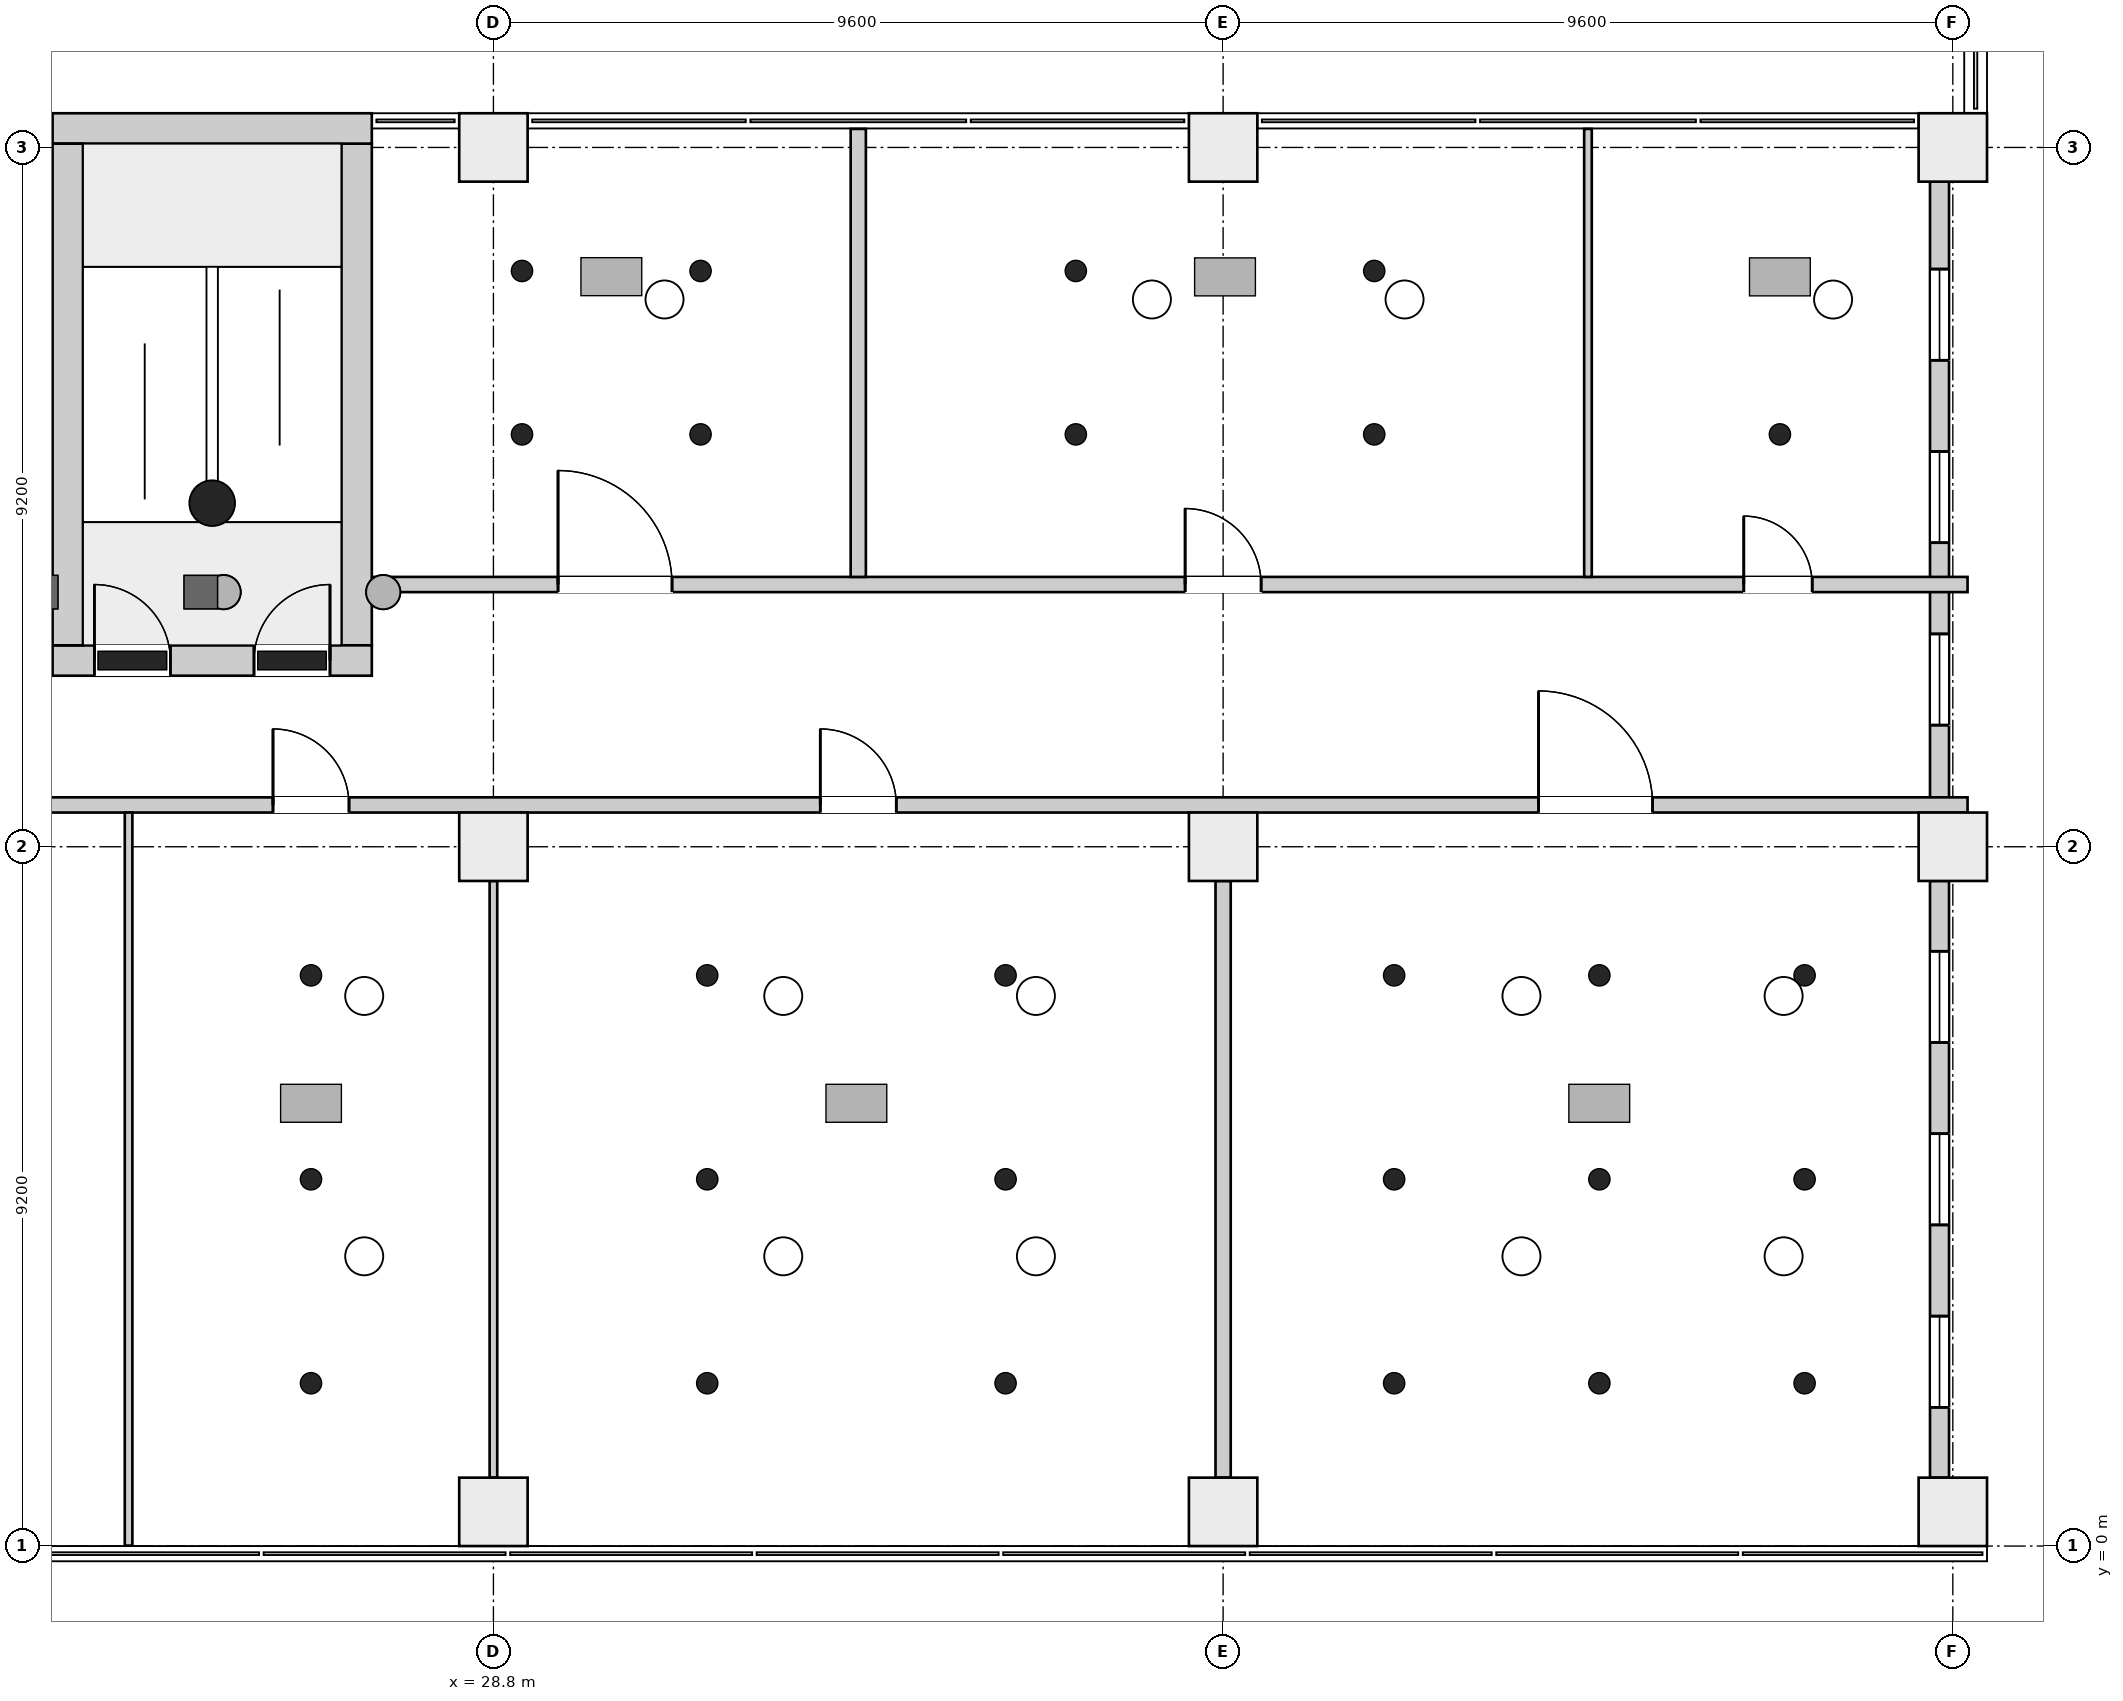
"""IFC4 building model, lengths in metres.
Left out: names, types, materials, properties, quantities, classifications, styles, units other than length and angle.
Written with IfcOpenShell. Run it as: python <this file> out.ifc"""

import sys

from ifc_helpers import new_model, si_unit, direction, frame, frame_2d, origin, origin_2d, place, context, subcontext, project, spatial, rectangle, extrude, element, fill, save


model = new_model("IFC4")
c1 = context("Model", 3, precision=1e-05, world=origin(), true_north=direction((0.0, 1.0)))
c2 = subcontext(c1, "Body", "Model", "MODEL_VIEW")
j1 = project(units=[si_unit("LENGTHUNIT", "METRE"), si_unit("PLANEANGLEUNIT", "RADIAN")], contexts=[c1])
p1 = place(None, origin())
s1 = spatial("IfcSite", under=j1, at=p1, CompositionType="ELEMENT")
p2 = place(p1, origin())
s2 = spatial("IfcBuilding", under=s1, at=p2, CompositionType="ELEMENT")
p3 = place(p2, frame((0.0, 0.0, 44.5)))
s3 = spatial("IfcBuildingStorey", under=s2, at=p3, CompositionType="ELEMENT", Elevation=44.5)
p4 = place(p3, frame((23.0, 11.65, 0.0), z_axis=(0.0, 0.0, 1.0), x_axis=(1.0, 0.0, 0.0)))
e1 = element("IfcWall", 1, at=p4, inside=s3, PredefinedType="SHEAR", context=c2, shape_type="SweptSolid", body=[
    extrude(rectangle(XDim=4.2, YDim=0.4, at=frame_2d((2.1, 0.0))), origin(), (0.0, 0.0, 1.0), 4.2),
])
p5 = place(p4, frame((0.55, 0.0, 0.0)))
e2 = element("IfcOpeningElement", 2, at=p5, cuts=e1, PredefinedType="OPENING", context=c2, shape_type="SweptSolid", body=[
    extrude(rectangle(XDim=1.0, YDim=2.1, at=frame_2d((0.5, 1.05))), frame((0.0, 0.21, 0.0), z_axis=(0.0, -1.0, 0.0), x_axis=(1.0, 0.0, 0.0)), (0.0, 0.0, 1.0), 0.42),
])
p6 = place(p4, frame((2.65, 0.0, 0.0)))
e3 = element("IfcOpeningElement", 3, at=p6, cuts=e1, PredefinedType="OPENING", context=c2, shape_type="SweptSolid", body=[
    extrude(rectangle(XDim=1.0, YDim=2.1, at=frame_2d((0.5, 1.05))), frame((0.0, 0.21, 0.0), z_axis=(0.0, -1.0, 0.0), x_axis=(1.0, 0.0, 0.0)), (0.0, 0.0, 1.0), 0.42),
])
p7 = place(p3, frame((23.0, 18.65, 0.0), z_axis=(0.0, 0.0, 1.0), x_axis=(1.0, 0.0, 0.0)))
e4 = element("IfcWall", 4, at=p7, inside=s3, PredefinedType="SHEAR", context=c2, shape_type="SweptSolid", body=[
    extrude(rectangle(XDim=4.2, YDim=0.4, at=frame_2d((2.1, 0.0))), origin(), (0.0, 0.0, 1.0), 4.2),
])
for number, where, z_axis, x_axis in (
    (5, (23.2, 11.85, 0.0), (0.0, 0.0, 1.0), (0.0, 1.0, 0.0)),
    (6, (27.0, 11.85, 0.0), (0.0, 0.0, 1.0), (0.0, 1.0, 0.0)),
):
    element("IfcWall", number, at=place(p3, frame(where, z_axis=z_axis, x_axis=x_axis)), inside=s3, PredefinedType="SHEAR", context=c2, shape_type="SweptSolid", body=[
        extrude(rectangle(XDim=6.6, YDim=0.4, at=frame_2d((3.3, 0.0))), origin(), (0.0, 0.0, 1.0), 4.2),
    ])
for number, where, z_axis, x_axis in (
    (7, (28.8, 0.45, 0.0), (0.0, 0.0, 1.0), (1.0, 0.0, 0.0)),
    (8, (38.4, 0.45, 0.0), (0.0, 0.0, 1.0), (1.0, 0.0, 0.0)),
    (9, (48.0, 0.45, 0.0), (0.0, 0.0, 1.0), (1.0, 0.0, 0.0)),
    (10, (28.8, 9.2, 0.0), (0.0, 0.0, 1.0), (1.0, 0.0, 0.0)),
    (11, (38.4, 9.2, 0.0), (0.0, 0.0, 1.0), (1.0, 0.0, 0.0)),
    (12, (48.0, 9.2, 0.0), (0.0, 0.0, 1.0), (1.0, 0.0, 0.0)),
    (13, (28.8, 18.4, 0.0), (0.0, 0.0, 1.0), (1.0, 0.0, 0.0)),
    (14, (38.4, 18.4, 0.0), (0.0, 0.0, 1.0), (1.0, 0.0, 0.0)),
    (15, (48.0, 18.4, 0.0), (0.0, 0.0, 1.0), (1.0, 0.0, 0.0)),
):
    element("IfcColumn", number, at=place(p3, frame(where, z_axis=z_axis, x_axis=x_axis)), inside=s3, PredefinedType="COLUMN", context=c2, shape_type="SweptSolid", body=[
        extrude(rectangle(XDim=0.9, YDim=0.9, at=origin_2d()), origin(), (0.0, 0.0, 1.0), 4.2),
    ])
p8 = place(p3, frame((47.825, 0.9, 0.0), z_axis=(0.0, 0.0, 1.0), x_axis=(0.0, 1.0, 0.0)))
e16 = element("IfcWall", 16, at=p8, inside=s3, PredefinedType="ELEMENTEDWALL", context=c2, shape_type="SweptSolid", body=[
    extrude(rectangle(XDim=7.85, YDim=0.25, at=frame_2d((3.925, 0.0))), origin(), (0.0, 0.0, 1.0), 3.3),
])
p9 = place(p8, frame((0.925, 0.0, 0.6)))
e17 = element("IfcOpeningElement", 17, at=p9, cuts=e16, PredefinedType="OPENING", context=c2, shape_type="SweptSolid", body=[
    extrude(rectangle(XDim=1.2, YDim=2.6, at=frame_2d((0.6, 1.3))), frame((0.0, 0.135, 0.0), z_axis=(0.0, -1.0, 0.0), x_axis=(1.0, 0.0, 0.0)), (0.0, 0.0, 1.0), 0.27),
])
p10 = place(p8, frame((3.325, 0.0, 0.6)))
e18 = element("IfcOpeningElement", 18, at=p10, cuts=e16, PredefinedType="OPENING", context=c2, shape_type="SweptSolid", body=[
    extrude(rectangle(XDim=1.2, YDim=2.6, at=frame_2d((0.6, 1.3))), frame((0.0, 0.135, 0.0), z_axis=(0.0, -1.0, 0.0), x_axis=(1.0, 0.0, 0.0)), (0.0, 0.0, 1.0), 0.27),
])
p11 = place(p8, frame((5.725, 0.0, 0.6)))
e19 = element("IfcOpeningElement", 19, at=p11, cuts=e16, PredefinedType="OPENING", context=c2, shape_type="SweptSolid", body=[
    extrude(rectangle(XDim=1.2, YDim=2.6, at=frame_2d((0.6, 1.3))), frame((0.0, 0.135, 0.0), z_axis=(0.0, -1.0, 0.0), x_axis=(1.0, 0.0, 0.0)), (0.0, 0.0, 1.0), 0.27),
])
p12 = place(p3, frame((47.825, 9.65, 0.0), z_axis=(0.0, 0.0, 1.0), x_axis=(0.0, 1.0, 0.0)))
e20 = element("IfcWall", 20, at=p12, inside=s3, PredefinedType="ELEMENTEDWALL", context=c2, shape_type="SweptSolid", body=[
    extrude(rectangle(XDim=8.3, YDim=0.25, at=frame_2d((4.15, 0.0))), origin(), (0.0, 0.0, 1.0), 3.3),
])
p13 = place(p12, frame((1.15, 0.0, 0.6)))
e21 = element("IfcOpeningElement", 21, at=p13, cuts=e20, PredefinedType="OPENING", context=c2, shape_type="SweptSolid", body=[
    extrude(rectangle(XDim=1.2, YDim=2.6, at=frame_2d((0.6, 1.3))), frame((0.0, 0.135, 0.0), z_axis=(0.0, -1.0, 0.0), x_axis=(1.0, 0.0, 0.0)), (0.0, 0.0, 1.0), 0.27),
])
p14 = place(p12, frame((3.55, 0.0, 0.6)))
e22 = element("IfcOpeningElement", 22, at=p14, cuts=e20, PredefinedType="OPENING", context=c2, shape_type="SweptSolid", body=[
    extrude(rectangle(XDim=1.2, YDim=2.6, at=frame_2d((0.6, 1.3))), frame((0.0, 0.135, 0.0), z_axis=(0.0, -1.0, 0.0), x_axis=(1.0, 0.0, 0.0)), (0.0, 0.0, 1.0), 0.27),
])
p15 = place(p12, frame((5.95, 0.0, 0.6)))
e23 = element("IfcOpeningElement", 23, at=p15, cuts=e20, PredefinedType="OPENING", context=c2, shape_type="SweptSolid", body=[
    extrude(rectangle(XDim=1.2, YDim=2.6, at=frame_2d((0.6, 1.3))), frame((0.0, 0.135, 0.0), z_axis=(0.0, -1.0, 0.0), x_axis=(1.0, 0.0, 0.0)), (0.0, 0.0, 1.0), 0.27),
])
p16 = place(p3, frame((4.3, 9.75, 0.0), z_axis=(0.0, 0.0, 1.0), x_axis=(1.0, 0.0, 0.0)))
e24 = element("IfcWall", 24, at=p16, inside=s3, PredefinedType="PARTITIONING", context=c2, shape_type="SweptSolid", body=[
    extrude(rectangle(XDim=43.894, YDim=0.2, at=frame_2d((21.947, 0.0))), origin(), (0.0, 0.0, 1.0), 3.9),
])
p17 = place(p16, frame((2.2, 0.0, 0.0)))
e25 = element("IfcOpeningElement", 25, at=p17, cuts=e24, PredefinedType="OPENING", context=c2, shape_type="SweptSolid", body=[
    extrude(rectangle(XDim=1.0, YDim=2.1, at=frame_2d((0.5, 1.05))), frame((0.0, 0.11, 0.0), z_axis=(0.0, -1.0, 0.0), x_axis=(1.0, 0.0, 0.0)), (0.0, 0.0, 1.0), 0.22),
])
p18 = place(p16, frame((12.0, 0.0, 0.0)))
e26 = element("IfcOpeningElement", 26, at=p18, cuts=e24, PredefinedType="OPENING", context=c2, shape_type="SweptSolid", body=[
    extrude(rectangle(XDim=1.0, YDim=2.1, at=frame_2d((0.5, 1.05))), frame((0.0, 0.11, 0.0), z_axis=(0.0, -1.0, 0.0), x_axis=(1.0, 0.0, 0.0)), (0.0, 0.0, 1.0), 0.22),
])
p19 = place(p16, frame((21.6, 0.0, 0.0)))
e27 = element("IfcOpeningElement", 27, at=p19, cuts=e24, PredefinedType="OPENING", context=c2, shape_type="SweptSolid", body=[
    extrude(rectangle(XDim=1.0, YDim=2.1, at=frame_2d((0.5, 1.05))), frame((0.0, 0.11, 0.0), z_axis=(0.0, -1.0, 0.0), x_axis=(1.0, 0.0, 0.0)), (0.0, 0.0, 1.0), 0.22),
])
p20 = place(p16, frame((28.8, 0.0, 0.0)))
e28 = element("IfcOpeningElement", 28, at=p20, cuts=e24, PredefinedType="OPENING", context=c2, shape_type="SweptSolid", body=[
    extrude(rectangle(XDim=1.0, YDim=2.1, at=frame_2d((0.5, 1.05))), frame((0.0, 0.11, 0.0), z_axis=(0.0, -1.0, 0.0), x_axis=(1.0, 0.0, 0.0)), (0.0, 0.0, 1.0), 0.22),
])
p21 = place(p16, frame((38.25, 0.0, 0.0)))
e29 = element("IfcOpeningElement", 29, at=p21, cuts=e24, PredefinedType="OPENING", context=c2, shape_type="SweptSolid", body=[
    extrude(rectangle(XDim=1.5, YDim=2.1, at=frame_2d((0.75, 1.05))), frame((0.0, 0.11, 0.0), z_axis=(0.0, -1.0, 0.0), x_axis=(1.0, 0.0, 0.0)), (0.0, 0.0, 1.0), 0.22),
])
p22 = place(p3, frame((24.0, 0.006, 0.0), z_axis=(0.0, 0.0, 1.0), x_axis=(0.0, 1.0, 0.0)))
e30 = element("IfcWall", 30, at=p22, inside=s3, PredefinedType="PARTITIONING", context=c2, shape_type="SweptSolid", body=[
    extrude(rectangle(XDim=9.644, YDim=0.1, at=frame_2d((4.822, 0.0))), origin(), (0.0, 0.0, 1.0), 3.9),
])
p23 = place(p3, frame((27.206, 12.65, 0.0), z_axis=(0.0, 0.0, 1.0), x_axis=(1.0, 0.0, 0.0)))
e31 = element("IfcWall", 31, at=p23, inside=s3, PredefinedType="PARTITIONING", context=c2, shape_type="SweptSolid", body=[
    extrude(rectangle(XDim=20.988, YDim=0.2, at=frame_2d((10.494, 0.0))), origin(), (0.0, 0.0, 1.0), 3.9),
])
p24 = place(p23, frame((2.444, 0.0, 0.0)))
e32 = element("IfcOpeningElement", 32, at=p24, cuts=e31, PredefinedType="OPENING", context=c2, shape_type="SweptSolid", body=[
    extrude(rectangle(XDim=1.5, YDim=2.1, at=frame_2d((0.75, 1.05))), frame((0.0, 0.11, 0.0), z_axis=(0.0, -1.0, 0.0), x_axis=(1.0, 0.0, 0.0)), (0.0, 0.0, 1.0), 0.22),
])
p25 = place(p23, frame((10.694, 0.0, 0.0)))
e33 = element("IfcOpeningElement", 33, at=p25, cuts=e31, PredefinedType="OPENING", context=c2, shape_type="SweptSolid", body=[
    extrude(rectangle(XDim=1.0, YDim=2.1, at=frame_2d((0.5, 1.05))), frame((0.0, 0.11, 0.0), z_axis=(0.0, -1.0, 0.0), x_axis=(1.0, 0.0, 0.0)), (0.0, 0.0, 1.0), 0.22),
])
p26 = place(p23, frame((18.044, 0.0, 0.0)))
e34 = element("IfcOpeningElement", 34, at=p26, cuts=e31, PredefinedType="OPENING", context=c2, shape_type="SweptSolid", body=[
    extrude(rectangle(XDim=0.9, YDim=2.1, at=frame_2d((0.45, 1.05))), frame((0.0, 0.11, 0.0), z_axis=(0.0, -1.0, 0.0), x_axis=(1.0, 0.0, 0.0)), (0.0, 0.0, 1.0), 0.22),
])
p27 = place(p3, frame((28.8, 0.9, 0.0), z_axis=(0.0, 0.0, 1.0), x_axis=(0.0, 1.0, 0.0)))
e35 = element("IfcWall", 35, at=p27, inside=s3, PredefinedType="PARTITIONING", context=c2, shape_type="SweptSolid", body=[
    extrude(rectangle(XDim=7.85, YDim=0.1, at=frame_2d((3.925, 0.0))), origin(), (0.0, 0.0, 1.0), 3.9),
])
p28 = place(p3, frame((33.6, 12.75, 0.0), z_axis=(0.0, 0.0, 1.0), x_axis=(0.0, 1.0, 0.0)))
e36 = element("IfcWall", 36, at=p28, inside=s3, PredefinedType="PARTITIONING", context=c2, shape_type="SweptSolid", body=[
    extrude(rectangle(XDim=5.894, YDim=0.2, at=frame_2d((2.947, 0.0))), origin(), (0.0, 0.0, 1.0), 3.9),
])
p29 = place(p3, frame((38.4, 0.9, 0.0), z_axis=(0.0, 0.0, 1.0), x_axis=(0.0, 1.0, 0.0)))
e37 = element("IfcWall", 37, at=p29, inside=s3, PredefinedType="PARTITIONING", context=c2, shape_type="SweptSolid", body=[
    extrude(rectangle(XDim=7.85, YDim=0.2, at=frame_2d((3.925, 0.0))), origin(), (0.0, 0.0, 1.0), 3.9),
])
p30 = place(p3, frame((43.2, 12.75, 0.0), z_axis=(0.0, 0.0, 1.0), x_axis=(0.0, 1.0, 0.0)))
e38 = element("IfcWall", 38, at=p30, inside=s3, PredefinedType="PARTITIONING", context=c2, shape_type="SweptSolid", body=[
    extrude(rectangle(XDim=5.894, YDim=0.1, at=frame_2d((2.947, 0.0))), origin(), (0.0, 0.0, 1.0), 3.9),
])
p31 = place(p9, origin())
e39 = element("IfcWindow", 39, at=p31, inside=s3, PartitioningType="SINGLE_PANEL", PredefinedType="WINDOW", context=c2, shape_type="SweptSolid", body=[
    extrude(rectangle(XDim=1.2, YDim=2.6, at=frame_2d((0.6, 1.3))), frame((0.0, 0.03, 0.0), z_axis=(0.0, -1.0, 0.0), x_axis=(1.0, 0.0, 0.0)), (0.0, 0.0, 1.0), 0.06),
])
fill(e17, e39)
p32 = place(p10, origin())
e40 = element("IfcWindow", 40, at=p32, inside=s3, PartitioningType="SINGLE_PANEL", PredefinedType="WINDOW", context=c2, shape_type="SweptSolid", body=[
    extrude(rectangle(XDim=1.2, YDim=2.6, at=frame_2d((0.6, 1.3))), frame((0.0, 0.03, 0.0), z_axis=(0.0, -1.0, 0.0), x_axis=(1.0, 0.0, 0.0)), (0.0, 0.0, 1.0), 0.06),
])
fill(e18, e40)
p33 = place(p11, origin())
e41 = element("IfcWindow", 41, at=p33, inside=s3, PartitioningType="SINGLE_PANEL", PredefinedType="WINDOW", context=c2, shape_type="SweptSolid", body=[
    extrude(rectangle(XDim=1.2, YDim=2.6, at=frame_2d((0.6, 1.3))), frame((0.0, 0.03, 0.0), z_axis=(0.0, -1.0, 0.0), x_axis=(1.0, 0.0, 0.0)), (0.0, 0.0, 1.0), 0.06),
])
fill(e19, e41)
p34 = place(p13, origin())
e42 = element("IfcWindow", 42, at=p34, inside=s3, PartitioningType="SINGLE_PANEL", PredefinedType="WINDOW", context=c2, shape_type="SweptSolid", body=[
    extrude(rectangle(XDim=1.2, YDim=2.6, at=frame_2d((0.6, 1.3))), frame((0.0, 0.03, 0.0), z_axis=(0.0, -1.0, 0.0), x_axis=(1.0, 0.0, 0.0)), (0.0, 0.0, 1.0), 0.06),
])
fill(e21, e42)
p35 = place(p14, origin())
e43 = element("IfcWindow", 43, at=p35, inside=s3, PartitioningType="SINGLE_PANEL", PredefinedType="WINDOW", context=c2, shape_type="SweptSolid", body=[
    extrude(rectangle(XDim=1.2, YDim=2.6, at=frame_2d((0.6, 1.3))), frame((0.0, 0.03, 0.0), z_axis=(0.0, -1.0, 0.0), x_axis=(1.0, 0.0, 0.0)), (0.0, 0.0, 1.0), 0.06),
])
fill(e22, e43)
p36 = place(p15, origin())
e44 = element("IfcWindow", 44, at=p36, inside=s3, PartitioningType="SINGLE_PANEL", PredefinedType="WINDOW", context=c2, shape_type="SweptSolid", body=[
    extrude(rectangle(XDim=1.2, YDim=2.6, at=frame_2d((0.6, 1.3))), frame((0.0, 0.03, 0.0), z_axis=(0.0, -1.0, 0.0), x_axis=(1.0, 0.0, 0.0)), (0.0, 0.0, 1.0), 0.06),
])
fill(e23, e44)
p37 = place(p5, origin())
e45 = element("IfcDoor", 45, at=p37, inside=s3, OperationType="SINGLE_SWING_RIGHT", PredefinedType="DOOR", context=c2, shape_type="SweptSolid", body=[
    extrude(rectangle(XDim=1.0, YDim=2.1, at=frame_2d((0.5, 1.05))), frame((0.0, 0.025, 0.0), z_axis=(0.0, -1.0, 0.0), x_axis=(1.0, 0.0, 0.0)), (0.0, 0.0, 1.0), 0.05),
])
fill(e2, e45)
p38 = place(p6, origin())
e46 = element("IfcDoor", 46, at=p38, inside=s3, OperationType="SINGLE_SWING_LEFT", PredefinedType="DOOR", context=c2, shape_type="SweptSolid", body=[
    extrude(rectangle(XDim=1.0, YDim=2.1, at=frame_2d((0.5, 1.05))), frame((0.0, 0.025, 0.0), z_axis=(0.0, -1.0, 0.0), x_axis=(1.0, 0.0, 0.0)), (0.0, 0.0, 1.0), 0.05),
])
fill(e3, e46)
p39 = place(p19, origin())
e47 = element("IfcDoor", 47, at=p39, inside=s3, OperationType="SINGLE_SWING_LEFT", PredefinedType="DOOR", context=c2, shape_type="SweptSolid", body=[
    extrude(rectangle(XDim=1.0, YDim=2.1, at=frame_2d((0.5, 1.05))), frame((0.0, 0.025, 0.0), z_axis=(0.0, -1.0, 0.0), x_axis=(1.0, 0.0, 0.0)), (0.0, 0.0, 1.0), 0.05),
])
fill(e27, e47)
p40 = place(p20, origin())
e48 = element("IfcDoor", 48, at=p40, inside=s3, OperationType="SINGLE_SWING_RIGHT", PredefinedType="DOOR", context=c2, shape_type="SweptSolid", body=[
    extrude(rectangle(XDim=1.0, YDim=2.1, at=frame_2d((0.5, 1.05))), frame((0.0, 0.025, 0.0), z_axis=(0.0, -1.0, 0.0), x_axis=(1.0, 0.0, 0.0)), (0.0, 0.0, 1.0), 0.05),
])
fill(e28, e48)
p41 = place(p21, origin())
e49 = element("IfcDoor", 49, at=p41, inside=s3, OperationType="DOUBLE_DOOR_SINGLE_SWING", PredefinedType="DOOR", context=c2, shape_type="SweptSolid", body=[
    extrude(rectangle(XDim=1.5, YDim=2.1, at=frame_2d((0.75, 1.05))), frame((0.0, 0.025, 0.0), z_axis=(0.0, -1.0, 0.0), x_axis=(1.0, 0.0, 0.0)), (0.0, 0.0, 1.0), 0.05),
])
fill(e29, e49)
p42 = place(p24, origin())
e50 = element("IfcDoor", 50, at=p42, inside=s3, OperationType="DOUBLE_DOOR_SINGLE_SWING", PredefinedType="DOOR", context=c2, shape_type="SweptSolid", body=[
    extrude(rectangle(XDim=1.5, YDim=2.1, at=frame_2d((0.75, 1.05))), frame((0.0, 0.025, 0.0), z_axis=(0.0, -1.0, 0.0), x_axis=(1.0, 0.0, 0.0)), (0.0, 0.0, 1.0), 0.05),
])
fill(e32, e50)
p43 = place(p25, origin())
e51 = element("IfcDoor", 51, at=p43, inside=s3, OperationType="SINGLE_SWING_RIGHT", PredefinedType="DOOR", context=c2, shape_type="SweptSolid", body=[
    extrude(rectangle(XDim=1.0, YDim=2.1, at=frame_2d((0.5, 1.05))), frame((0.0, 0.025, 0.0), z_axis=(0.0, -1.0, 0.0), x_axis=(1.0, 0.0, 0.0)), (0.0, 0.0, 1.0), 0.05),
])
fill(e33, e51)
p44 = place(p26, origin())
e52 = element("IfcDoor", 52, at=p44, inside=s3, OperationType="SINGLE_SWING_RIGHT", PredefinedType="DOOR", context=c2, shape_type="SweptSolid", body=[
    extrude(rectangle(XDim=0.9, YDim=2.1, at=frame_2d((0.45, 1.05))), frame((0.0, 0.025, 0.0), z_axis=(0.0, -1.0, 0.0), x_axis=(1.0, 0.0, 0.0)), (0.0, 0.0, 1.0), 0.05),
])
fill(e34, e52)
save(model, sys.argv[1])
